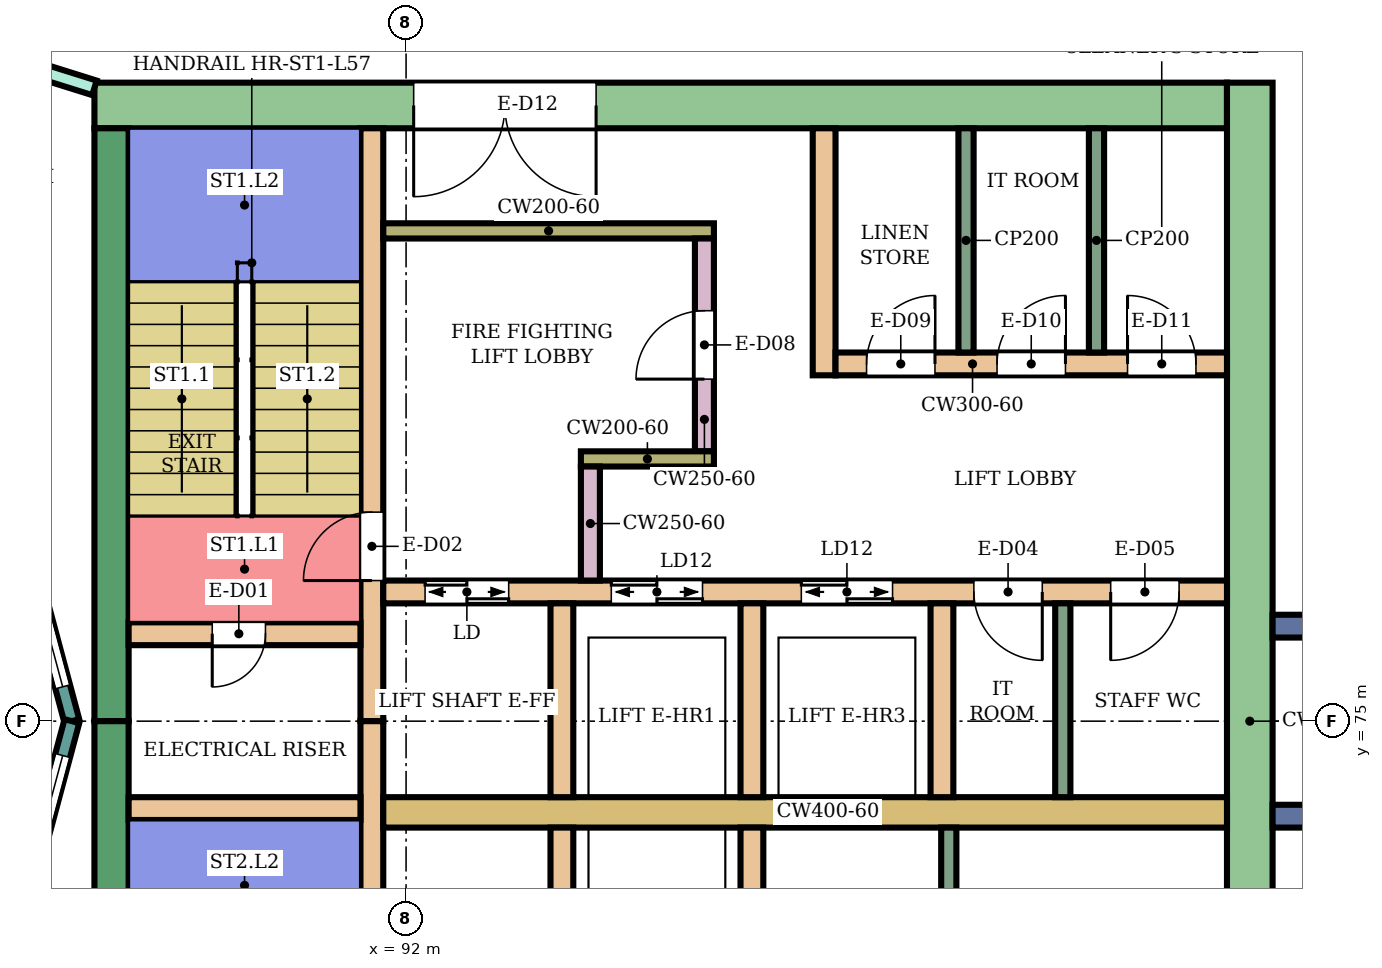
"""IFC4 building model, lengths in metres.
Left out: names, types, materials, properties, quantities, classifications, styles, units other than length and angle.
Written with IfcOpenShell. Run it as: python <this file> out.ifc"""

import sys

from ifc_helpers import new_model, si_unit, direction, frame, frame_2d, origin, place, context, subcontext, project, spatial, rectangle, extrude, element, fill, save


model = new_model("IFC4")
c1 = context("Model", 3, precision=1e-05, world=origin(), true_north=direction((0.0, 1.0)))
c2 = subcontext(c1, "Body", "Model", "MODEL_VIEW")
j1 = project(units=[si_unit("LENGTHUNIT", "METRE"), si_unit("PLANEANGLEUNIT", "RADIAN")], contexts=[c1])
p1 = place(None, origin())
s1 = spatial("IfcSite", under=j1, at=p1, CompositionType="ELEMENT")
p2 = place(p1, origin())
s2 = spatial("IfcBuilding", under=s1, at=p2, CompositionType="ELEMENT")
p3 = place(p2, frame((0.0, 0.0, 249.9)))
s3 = spatial("IfcBuildingStorey", under=s2, at=p3, CompositionType="ELEMENT", Elevation=249.9)
p4 = place(p3, frame((87.9, 83.1, 0.0), z_axis=(0.0, 0.0, 1.0), x_axis=(1.0, 0.0, 0.0)))
e1 = element("IfcWall", 1, at=p4, inside=s3, PredefinedType="SHEAR", context=c2, shape_type="SweptSolid", body=[
    extrude(rectangle(XDim=14.9, YDim=0.6, at=frame_2d((7.45, 0.0))), origin(), (0.0, 0.0, 1.0), 3.88),
])
p5 = place(p4, frame((4.2, 0.0, 0.0)))
e2 = element("IfcOpeningElement", 2, at=p5, cuts=e1, PredefinedType="OPENING", context=c2, shape_type="SweptSolid", body=[
    extrude(rectangle(XDim=2.4, YDim=2.4, at=frame_2d((1.2, 1.2))), frame((0.0, 0.31, 0.0), z_axis=(0.0, -1.0, 0.0), x_axis=(1.0, 0.0, 0.0)), (0.0, 0.0, 1.0), 0.62),
])
for number, where, z_axis, x_axis in (
    (3, (88.125, 75.0, 0.0), (0.0, 0.0, 1.0), (0.0, 1.0, 0.0)),
    (4, (88.125, 67.2, 0.0), (0.0, 0.0, 1.0), (0.0, 1.0, 0.0)),
):
    element("IfcWall", number, at=place(p3, frame(where, z_axis=z_axis, x_axis=x_axis)), inside=s3, PredefinedType="SHEAR", context=c2, shape_type="SweptSolid", body=[
        extrude(rectangle(XDim=7.8, YDim=0.45, at=frame_2d((3.9, 0.0))), origin(), (0.0, 0.0, 1.0), 3.88),
    ])
p6 = place(p3, frame((103.1, 66.6, 0.0), z_axis=(0.0, 0.0, 1.0), x_axis=(0.0, 1.0, 0.0)))
e5 = element("IfcWall", 5, at=p6, inside=s3, PredefinedType="SHEAR", context=c2, shape_type="SweptSolid", body=[
    extrude(rectangle(XDim=16.8, YDim=0.6, at=frame_2d((8.4, 0.0))), origin(), (0.0, 0.0, 1.0), 3.88),
])
p7 = place(p3, frame((91.55, 75.0, 0.0), z_axis=(0.0, 0.0, 1.0), x_axis=(0.0, 1.0, 0.0)))
e6 = element("IfcWall", 6, at=p7, inside=s3, PredefinedType="SHEAR", context=c2, shape_type="SweptSolid", body=[
    extrude(rectangle(XDim=7.8, YDim=0.3, at=frame_2d((3.9, 0.0))), origin(), (0.0, 0.0, 1.0), 3.88),
])
p8 = place(p7, frame((1.85, 0.0, 0.0)))
e7 = element("IfcOpeningElement", 7, at=p8, cuts=e6, PredefinedType="OPENING", context=c2, shape_type="SweptSolid", body=[
    extrude(rectangle(XDim=0.9, YDim=2.1, at=frame_2d((0.45, 1.05))), frame((0.0, 0.16, 0.0), z_axis=(0.0, -1.0, 0.0), x_axis=(1.0, 0.0, 0.0)), (0.0, 0.0, 1.0), 0.32),
])
p9 = place(p3, frame((91.55, 67.2, 0.0), z_axis=(0.0, 0.0, 1.0), x_axis=(0.0, 1.0, 0.0)))
e8 = element("IfcWall", 8, at=p9, inside=s3, PredefinedType="SHEAR", context=c2, shape_type="SweptSolid", body=[
    extrude(rectangle(XDim=7.8, YDim=0.3, at=frame_2d((3.9, 0.0))), origin(), (0.0, 0.0, 1.0), 3.88),
])
p10 = place(p9, frame((0.45, 0.0, 0.0)))
e9 = element("IfcOpeningElement", 9, at=p10, cuts=e8, PredefinedType="OPENING", context=c2, shape_type="SweptSolid", body=[
    extrude(rectangle(XDim=0.9, YDim=2.1, at=frame_2d((0.45, 1.05))), frame((0.0, 0.16, 0.0), z_axis=(0.0, -1.0, 0.0), x_axis=(1.0, 0.0, 0.0)), (0.0, 0.0, 1.0), 0.32),
])
p11 = place(p3, frame((88.35, 76.15, 0.0), z_axis=(0.0, 0.0, 1.0), x_axis=(1.0, 0.0, 0.0)))
e10 = element("IfcWall", 10, at=p11, inside=s3, PredefinedType="SHEAR", context=c2, shape_type="SweptSolid", body=[
    extrude(rectangle(XDim=3.05, YDim=0.3, at=frame_2d((1.525, 0.0))), origin(), (0.0, 0.0, 1.0), 3.88),
])
p12 = place(p11, frame((1.1, 0.0, 0.0)))
e11 = element("IfcOpeningElement", 11, at=p12, cuts=e10, PredefinedType="OPENING", context=c2, shape_type="SweptSolid", body=[
    extrude(rectangle(XDim=0.7, YDim=2.0, at=frame_2d((0.35, 1.0))), frame((0.0, 0.16, 0.0), z_axis=(0.0, -1.0, 0.0), x_axis=(1.0, 0.0, 0.0)), (0.0, 0.0, 1.0), 0.32),
])
p13 = place(p3, frame((88.35, 73.85, 0.0), z_axis=(0.0, 0.0, 1.0), x_axis=(1.0, 0.0, 0.0)))
e12 = element("IfcWall", 12, at=p13, inside=s3, PredefinedType="SHEAR", context=c2, shape_type="SweptSolid", body=[
    extrude(rectangle(XDim=3.05, YDim=0.3, at=frame_2d((1.525, 0.0))), origin(), (0.0, 0.0, 1.0), 3.88),
])
p14 = place(p3, frame((91.7, 76.7, 0.0), z_axis=(0.0, 0.0, 1.0), x_axis=(1.0, 0.0, 0.0)))
e13 = element("IfcWall", 13, at=p14, inside=s3, PredefinedType="SHEAR", context=c2, shape_type="SweptSolid", body=[
    extrude(rectangle(XDim=11.1, YDim=0.3, at=frame_2d((5.55, 0.0))), origin(), (0.0, 0.0, 1.0), 3.88),
])
p15 = place(p14, frame((0.55, 0.0, 0.0)))
e14 = element("IfcOpeningElement", 14, at=p15, cuts=e13, PredefinedType="OPENING", context=c2, shape_type="SweptSolid", body=[
    extrude(rectangle(XDim=1.1, YDim=2.1, at=frame_2d((0.55, 1.05))), frame((0.0, 0.16, 0.0), z_axis=(0.0, -1.0, 0.0), x_axis=(1.0, 0.0, 0.0)), (0.0, 0.0, 1.0), 0.32),
])
p16 = place(p14, frame((3.0, 0.0, 0.0)))
e15 = element("IfcOpeningElement", 15, at=p16, cuts=e13, PredefinedType="OPENING", context=c2, shape_type="SweptSolid", body=[
    extrude(rectangle(XDim=1.2, YDim=2.1, at=frame_2d((0.6, 1.05))), frame((0.0, 0.16, 0.0), z_axis=(0.0, -1.0, 0.0), x_axis=(1.0, 0.0, 0.0)), (0.0, 0.0, 1.0), 0.32),
])
p17 = place(p14, frame((5.5, 0.0, 0.0)))
e16 = element("IfcOpeningElement", 16, at=p17, cuts=e13, PredefinedType="OPENING", context=c2, shape_type="SweptSolid", body=[
    extrude(rectangle(XDim=1.2, YDim=2.1, at=frame_2d((0.6, 1.05))), frame((0.0, 0.16, 0.0), z_axis=(0.0, -1.0, 0.0), x_axis=(1.0, 0.0, 0.0)), (0.0, 0.0, 1.0), 0.32),
])
p18 = place(p14, frame((7.77, 0.0, 0.0)))
e17 = element("IfcOpeningElement", 17, at=p18, cuts=e13, PredefinedType="OPENING", context=c2, shape_type="SweptSolid", body=[
    extrude(rectangle(XDim=0.9, YDim=2.1, at=frame_2d((0.45, 1.05))), frame((0.0, 0.16, 0.0), z_axis=(0.0, -1.0, 0.0), x_axis=(1.0, 0.0, 0.0)), (0.0, 0.0, 1.0), 0.32),
])
p19 = place(p14, frame((9.57, 0.0, 0.0)))
e18 = element("IfcOpeningElement", 18, at=p19, cuts=e13, PredefinedType="OPENING", context=c2, shape_type="SweptSolid", body=[
    extrude(rectangle(XDim=0.9, YDim=2.1, at=frame_2d((0.45, 1.05))), frame((0.0, 0.16, 0.0), z_axis=(0.0, -1.0, 0.0), x_axis=(1.0, 0.0, 0.0)), (0.0, 0.0, 1.0), 0.32),
])
p20 = place(p3, frame((91.7, 73.8, 0.0), z_axis=(0.0, 0.0, 1.0), x_axis=(1.0, 0.0, 0.0)))
e19 = element("IfcWall", 19, at=p20, inside=s3, PredefinedType="SHEAR", context=c2, shape_type="SweptSolid", body=[
    extrude(rectangle(XDim=11.1, YDim=0.4, at=frame_2d((5.55, 0.0))), origin(), (0.0, 0.0, 1.0), 3.88),
])
for number, where, z_axis, x_axis in (
    (20, (94.05, 74.0, 0.0), (0.0, 0.0, 1.0), (0.0, 1.0, 0.0)),
    (21, (96.55, 74.0, 0.0), (0.0, 0.0, 1.0), (0.0, 1.0, 0.0)),
    (22, (99.05, 74.0, 0.0), (0.0, 0.0, 1.0), (0.0, 1.0, 0.0)),
    (23, (94.05, 71.05, 0.0), (0.0, 0.0, 1.0), (0.0, 1.0, 0.0)),
    (24, (96.55, 71.05, 0.0), (0.0, 0.0, 1.0), (0.0, 1.0, 0.0)),
):
    element("IfcWall", number, at=place(p3, frame(where, z_axis=z_axis, x_axis=x_axis)), inside=s3, PredefinedType="SHEAR", context=c2, shape_type="SweptSolid", body=[
        extrude(rectangle(XDim=2.55, YDim=0.3, at=frame_2d((1.275, 0.0))), origin(), (0.0, 0.0, 1.0), 3.88),
    ])
p21 = place(p3, frame((91.7, 81.45, 0.0), z_axis=(0.0, 0.0, 1.0), x_axis=(1.0, 0.0, 0.0)))
e25 = element("IfcWall", 25, at=p21, inside=s3, PredefinedType="SHEAR", context=c2, shape_type="SweptSolid", body=[
    extrude(rectangle(XDim=4.35, YDim=0.2, at=frame_2d((2.175, 0.0))), origin(), (0.0, 0.0, 1.0), 3.88),
])
p22 = place(p3, frame((95.925, 78.55, 0.0), z_axis=(0.0, 0.0, 1.0), x_axis=(0.0, 1.0, 0.0)))
e26 = element("IfcWall", 26, at=p22, inside=s3, PredefinedType="SHEAR", context=c2, shape_type="SweptSolid", body=[
    extrude(rectangle(XDim=2.8, YDim=0.25, at=frame_2d((1.4, 0.0))), origin(), (0.0, 0.0, 1.0), 3.88),
])
p23 = place(p22, frame((0.95, 0.0, 0.0)))
e27 = element("IfcOpeningElement", 27, at=p23, cuts=e26, PredefinedType="OPENING", context=c2, shape_type="SweptSolid", body=[
    extrude(rectangle(XDim=0.9, YDim=2.1, at=frame_2d((0.45, 1.05))), frame((0.0, 0.135, 0.0), z_axis=(0.0, -1.0, 0.0), x_axis=(1.0, 0.0, 0.0)), (0.0, 0.0, 1.0), 0.27),
])
p24 = place(p3, frame((94.3, 78.45, 0.0), z_axis=(0.0, 0.0, 1.0), x_axis=(1.0, 0.0, 0.0)))
e28 = element("IfcWall", 28, at=p24, inside=s3, PredefinedType="SHEAR", context=c2, shape_type="SweptSolid", body=[
    extrude(rectangle(XDim=1.75, YDim=0.2, at=frame_2d((0.875, 0.0))), origin(), (0.0, 0.0, 1.0), 3.88),
])
p25 = place(p3, frame((94.425, 76.85, 0.0), z_axis=(0.0, 0.0, 1.0), x_axis=(0.0, 1.0, 0.0)))
e29 = element("IfcWall", 29, at=p25, inside=s3, PredefinedType="SHEAR", context=c2, shape_type="SweptSolid", body=[
    extrude(rectangle(XDim=1.5, YDim=0.25, at=frame_2d((0.75, 0.0))), origin(), (0.0, 0.0, 1.0), 3.88),
])
p26 = place(p3, frame((97.5, 79.55, 0.0), z_axis=(0.0, 0.0, 1.0), x_axis=(0.0, 1.0, 0.0)))
e30 = element("IfcWall", 30, at=p26, inside=s3, PredefinedType="SHEAR", context=c2, shape_type="SweptSolid", body=[
    extrude(rectangle(XDim=3.25, YDim=0.3, at=frame_2d((1.625, 0.0))), origin(), (0.0, 0.0, 1.0), 3.88),
])
p27 = place(p3, frame((97.65, 79.7, 0.0), z_axis=(0.0, 0.0, 1.0), x_axis=(1.0, 0.0, 0.0)))
e31 = element("IfcWall", 31, at=p27, inside=s3, PredefinedType="SHEAR", context=c2, shape_type="SweptSolid", body=[
    extrude(rectangle(XDim=5.15, YDim=0.3, at=frame_2d((2.575, 0.0))), origin(), (0.0, 0.0, 1.0), 3.88),
])
p28 = place(p27, frame((0.408, 0.0, 0.0)))
e32 = element("IfcOpeningElement", 32, at=p28, cuts=e31, PredefinedType="OPENING", context=c2, shape_type="SweptSolid", body=[
    extrude(rectangle(XDim=0.9, YDim=2.1, at=frame_2d((0.45, 1.05))), frame((0.0, 0.16, 0.0), z_axis=(0.0, -1.0, 0.0), x_axis=(1.0, 0.0, 0.0)), (0.0, 0.0, 1.0), 0.32),
])
p29 = place(p27, frame((2.125, 0.0, 0.0)))
e33 = element("IfcOpeningElement", 33, at=p29, cuts=e31, PredefinedType="OPENING", context=c2, shape_type="SweptSolid", body=[
    extrude(rectangle(XDim=0.9, YDim=2.1, at=frame_2d((0.45, 1.05))), frame((0.0, 0.16, 0.0), z_axis=(0.0, -1.0, 0.0), x_axis=(1.0, 0.0, 0.0)), (0.0, 0.0, 1.0), 0.32),
])
p30 = place(p27, frame((3.842, 0.0, 0.0)))
e34 = element("IfcOpeningElement", 34, at=p30, cuts=e31, PredefinedType="OPENING", context=c2, shape_type="SweptSolid", body=[
    extrude(rectangle(XDim=0.9, YDim=2.1, at=frame_2d((0.45, 1.05))), frame((0.0, 0.16, 0.0), z_axis=(0.0, -1.0, 0.0), x_axis=(1.0, 0.0, 0.0)), (0.0, 0.0, 1.0), 0.32),
])
for number, where, z_axis, x_axis in (
    (35, (103.4, 73.75, 0.0), (0.0, 0.0, 1.0), (1.0, 0.0, 0.0)),
    (36, (103.4, 76.25, 0.0), (0.0, 0.0, 1.0), (1.0, 0.0, 0.0)),
):
    element("IfcWall", number, at=place(p3, frame(where, z_axis=z_axis, x_axis=x_axis)), inside=s3, PredefinedType="NOTDEFINED", context=c2, shape_type="SweptSolid", body=[
        extrude(rectangle(XDim=2.416, YDim=0.3, at=frame_2d((1.208, 0.0))), origin(), (0.0, 0.0, 1.0), 4.2),
    ])
p31 = place(p3, frame((87.604, 75.0, 0.0), z_axis=(0.0, 0.0, 1.0), x_axis=(-0.258789828301, 0.965933654434, 0.0)))
e37 = element("IfcWall", 37, at=p31, inside=s3, PredefinedType="NOTDEFINED", context=c2, shape_type="SweptSolid", body=[
    extrude(rectangle(XDim=3.936, YDim=0.2, at=frame_2d((1.968, 0.0))), origin(), (0.0, 0.0, 1.0), 4.2),
])
p32 = place(p31, frame((0.468, 0.0, 0.9)))
e38 = element("IfcOpeningElement", 38, at=p32, cuts=e37, PredefinedType="OPENING", context=c2, shape_type="SweptSolid", body=[
    extrude(rectangle(XDim=3.0, YDim=2.3, at=frame_2d((1.5, 1.15))), frame((0.0, 0.11, 0.0), z_axis=(0.0, -1.0, 0.0), x_axis=(1.0, 0.0, 0.0)), (0.0, 0.0, 1.0), 0.22),
])
p33 = place(p3, frame((86.585, 71.198, 0.0), z_axis=(0.0, 0.0, 1.0), x_axis=(0.258789828301, 0.965933654434, 0.0)))
e39 = element("IfcWall", 39, at=p33, inside=s3, PredefinedType="NOTDEFINED", context=c2, shape_type="SweptSolid", body=[
    extrude(rectangle(XDim=3.936, YDim=0.2, at=frame_2d((1.968, 0.0))), origin(), (0.0, 0.0, 1.0), 4.2),
])
p34 = place(p33, frame((0.468, 0.0, 0.9)))
e40 = element("IfcOpeningElement", 40, at=p34, cuts=e39, PredefinedType="OPENING", context=c2, shape_type="SweptSolid", body=[
    extrude(rectangle(XDim=3.0, YDim=2.3, at=frame_2d((1.5, 1.15))), frame((0.0, 0.11, 0.0), z_axis=(0.0, -1.0, 0.0), x_axis=(1.0, 0.0, 0.0)), (0.0, 0.0, 1.0), 0.22),
])
p35 = place(p3, frame((85.587, 84.057, 0.0), z_axis=(0.0, 0.0, 1.0), x_axis=(0.954239513179, -0.299043393987, 0.0)))
e41 = element("IfcWall", 41, at=p35, inside=s3, PredefinedType="PARTITIONING", context=c2, shape_type="SweptSolid", body=[
    extrude(rectangle(XDim=2.424, YDim=0.2, at=frame_2d((1.212, 0.0))), origin(), (0.0, 0.0, 1.0), 3.75),
])
p36 = place(p35, frame((0.762, 0.0, 0.0)))
e42 = element("IfcOpeningElement", 42, at=p36, cuts=e41, PredefinedType="OPENING", context=c2, shape_type="SweptSolid", body=[
    extrude(rectangle(XDim=0.9, YDim=2.1, at=frame_2d((0.45, 1.05))), frame((0.0, 0.11, 0.0), z_axis=(0.0, -1.0, 0.0), x_axis=(1.0, 0.0, 0.0)), (0.0, 0.0, 1.0), 0.22),
])
for number, where, z_axis, x_axis in (
    (43, (100.64, 74.0, 0.0), (0.0, 0.0, 1.0), (0.0, 1.0, 0.0)),
    (44, (99.14, 71.05, 0.0), (0.0, 0.0, 1.0), (0.0, 1.0, 0.0)),
):
    element("IfcWall", number, at=place(p3, frame(where, z_axis=z_axis, x_axis=x_axis)), inside=s3, PredefinedType="PARTITIONING", context=c2, shape_type="SweptSolid", body=[
        extrude(rectangle(XDim=2.55, YDim=0.2, at=frame_2d((1.275, 0.0))), origin(), (0.0, 0.0, 1.0), 3.88),
    ])
for number, where, z_axis, x_axis in (
    (45, (99.367, 79.85, 0.0), (0.0, 0.0, 1.0), (0.0, 1.0, 0.0)),
    (46, (101.083, 79.85, 0.0), (0.0, 0.0, 1.0), (0.0, 1.0, 0.0)),
):
    element("IfcWall", number, at=place(p3, frame(where, z_axis=z_axis, x_axis=x_axis)), inside=s3, PredefinedType="PARTITIONING", context=c2, shape_type="SweptSolid", body=[
        extrude(rectangle(XDim=2.95, YDim=0.2, at=frame_2d((1.475, 0.0))), origin(), (0.0, 0.0, 1.0), 3.88),
    ])
p37 = place(p32, origin())
e47 = element("IfcWindow", 47, at=p37, inside=s3, PartitioningType="SINGLE_PANEL", PredefinedType="WINDOW", context=c2, shape_type="SweptSolid", body=[
    extrude(rectangle(XDim=3.0, YDim=2.3, at=frame_2d((1.5, 1.15))), frame((0.0, 0.03, 0.0), z_axis=(0.0, -1.0, 0.0), x_axis=(1.0, 0.0, 0.0)), (0.0, 0.0, 1.0), 0.06),
])
fill(e38, e47)
p38 = place(p34, origin())
e48 = element("IfcWindow", 48, at=p38, inside=s3, PartitioningType="SINGLE_PANEL", PredefinedType="WINDOW", context=c2, shape_type="SweptSolid", body=[
    extrude(rectangle(XDim=3.0, YDim=2.3, at=frame_2d((1.5, 1.15))), frame((0.0, 0.03, 0.0), z_axis=(0.0, -1.0, 0.0), x_axis=(1.0, 0.0, 0.0)), (0.0, 0.0, 1.0), 0.06),
])
fill(e40, e48)
p39 = place(p12, frame((0.7, 0.0, 0.0), z_axis=(0.0, 0.0, 1.0), x_axis=(-1.0, 0.0, 0.0)))
e49 = element("IfcDoor", 49, at=p39, inside=s3, OperationType="SINGLE_SWING_RIGHT", PredefinedType="DOOR", context=c2, shape_type="SweptSolid", body=[
    extrude(rectangle(XDim=0.7, YDim=2.0, at=frame_2d((0.35, 1.0))), frame((0.0, 0.025, 0.0), z_axis=(0.0, -1.0, 0.0), x_axis=(1.0, 0.0, 0.0)), (0.0, 0.0, 1.0), 0.05),
])
fill(e11, e49)
p40 = place(p8, origin())
e50 = element("IfcDoor", 50, at=p40, inside=s3, OperationType="SINGLE_SWING_LEFT", PredefinedType="DOOR", context=c2, shape_type="SweptSolid", body=[
    extrude(rectangle(XDim=0.9, YDim=2.1, at=frame_2d((0.45, 1.05))), frame((0.0, 0.025, 0.0), z_axis=(0.0, -1.0, 0.0), x_axis=(1.0, 0.0, 0.0)), (0.0, 0.0, 1.0), 0.05),
])
fill(e7, e50)
p41 = place(p15, origin())
e51 = element("IfcDoor", 51, at=p41, inside=s3, OperationType="DOUBLE_DOOR_SLIDING", PredefinedType="DOOR", context=c2, shape_type="SweptSolid", body=[
    extrude(rectangle(XDim=1.1, YDim=2.1, at=frame_2d((0.55, 1.05))), frame((0.0, 0.025, 0.0), z_axis=(0.0, -1.0, 0.0), x_axis=(1.0, 0.0, 0.0)), (0.0, 0.0, 1.0), 0.05),
])
fill(e14, e51)
p42 = place(p16, origin())
e52 = element("IfcDoor", 52, at=p42, inside=s3, OperationType="DOUBLE_DOOR_SLIDING", PredefinedType="DOOR", context=c2, shape_type="SweptSolid", body=[
    extrude(rectangle(XDim=1.2, YDim=2.1, at=frame_2d((0.6, 1.05))), frame((0.0, 0.025, 0.0), z_axis=(0.0, -1.0, 0.0), x_axis=(1.0, 0.0, 0.0)), (0.0, 0.0, 1.0), 0.05),
])
fill(e15, e52)
p43 = place(p17, origin())
e53 = element("IfcDoor", 53, at=p43, inside=s3, OperationType="DOUBLE_DOOR_SLIDING", PredefinedType="DOOR", context=c2, shape_type="SweptSolid", body=[
    extrude(rectangle(XDim=1.2, YDim=2.1, at=frame_2d((0.6, 1.05))), frame((0.0, 0.025, 0.0), z_axis=(0.0, -1.0, 0.0), x_axis=(1.0, 0.0, 0.0)), (0.0, 0.0, 1.0), 0.05),
])
fill(e16, e53)
p44 = place(p18, frame((0.9, 0.0, 0.0), z_axis=(0.0, 0.0, 1.0), x_axis=(-1.0, 0.0, 0.0)))
e54 = element("IfcDoor", 54, at=p44, inside=s3, OperationType="SINGLE_SWING_LEFT", PredefinedType="DOOR", context=c2, shape_type="SweptSolid", body=[
    extrude(rectangle(XDim=0.9, YDim=2.1, at=frame_2d((0.45, 1.05))), frame((0.0, 0.025, 0.0), z_axis=(0.0, -1.0, 0.0), x_axis=(1.0, 0.0, 0.0)), (0.0, 0.0, 1.0), 0.05),
])
fill(e17, e54)
p45 = place(p19, frame((0.9, 0.0, 0.0), z_axis=(0.0, 0.0, 1.0), x_axis=(-1.0, 0.0, 0.0)))
e55 = element("IfcDoor", 55, at=p45, inside=s3, OperationType="SINGLE_SWING_RIGHT", PredefinedType="DOOR", context=c2, shape_type="SweptSolid", body=[
    extrude(rectangle(XDim=0.9, YDim=2.1, at=frame_2d((0.45, 1.05))), frame((0.0, 0.025, 0.0), z_axis=(0.0, -1.0, 0.0), x_axis=(1.0, 0.0, 0.0)), (0.0, 0.0, 1.0), 0.05),
])
fill(e18, e55)
p46 = place(p23, origin())
e56 = element("IfcDoor", 56, at=p46, inside=s3, OperationType="SINGLE_SWING_LEFT", PredefinedType="DOOR", context=c2, shape_type="SweptSolid", body=[
    extrude(rectangle(XDim=0.9, YDim=2.1, at=frame_2d((0.45, 1.05))), frame((0.0, 0.025, 0.0), z_axis=(0.0, -1.0, 0.0), x_axis=(1.0, 0.0, 0.0)), (0.0, 0.0, 1.0), 0.05),
])
fill(e27, e56)
p47 = place(p28, origin())
e57 = element("IfcDoor", 57, at=p47, inside=s3, OperationType="SINGLE_SWING_RIGHT", PredefinedType="DOOR", context=c2, shape_type="SweptSolid", body=[
    extrude(rectangle(XDim=0.9, YDim=2.1, at=frame_2d((0.45, 1.05))), frame((0.0, 0.025, 0.0), z_axis=(0.0, -1.0, 0.0), x_axis=(1.0, 0.0, 0.0)), (0.0, 0.0, 1.0), 0.05),
])
fill(e32, e57)
p48 = place(p29, origin())
e58 = element("IfcDoor", 58, at=p48, inside=s3, OperationType="SINGLE_SWING_RIGHT", PredefinedType="DOOR", context=c2, shape_type="SweptSolid", body=[
    extrude(rectangle(XDim=0.9, YDim=2.1, at=frame_2d((0.45, 1.05))), frame((0.0, 0.025, 0.0), z_axis=(0.0, -1.0, 0.0), x_axis=(1.0, 0.0, 0.0)), (0.0, 0.0, 1.0), 0.05),
])
fill(e33, e58)
p49 = place(p30, origin())
e59 = element("IfcDoor", 59, at=p49, inside=s3, OperationType="SINGLE_SWING_LEFT", PredefinedType="DOOR", context=c2, shape_type="SweptSolid", body=[
    extrude(rectangle(XDim=0.9, YDim=2.1, at=frame_2d((0.45, 1.05))), frame((0.0, 0.025, 0.0), z_axis=(0.0, -1.0, 0.0), x_axis=(1.0, 0.0, 0.0)), (0.0, 0.0, 1.0), 0.05),
])
fill(e34, e59)
p50 = place(p5, frame((2.4, 0.0, 0.0), z_axis=(0.0, 0.0, 1.0), x_axis=(-1.0, 0.0, 0.0)))
e60 = element("IfcDoor", 60, at=p50, inside=s3, OperationType="DOUBLE_DOOR_SINGLE_SWING", PredefinedType="DOOR", context=c2, shape_type="SweptSolid", body=[
    extrude(rectangle(XDim=2.4, YDim=2.4, at=frame_2d((1.2, 1.2))), frame((0.0, 0.025, 0.0), z_axis=(0.0, -1.0, 0.0), x_axis=(1.0, 0.0, 0.0)), (0.0, 0.0, 1.0), 0.05),
])
fill(e2, e60)
save(model, sys.argv[1])
